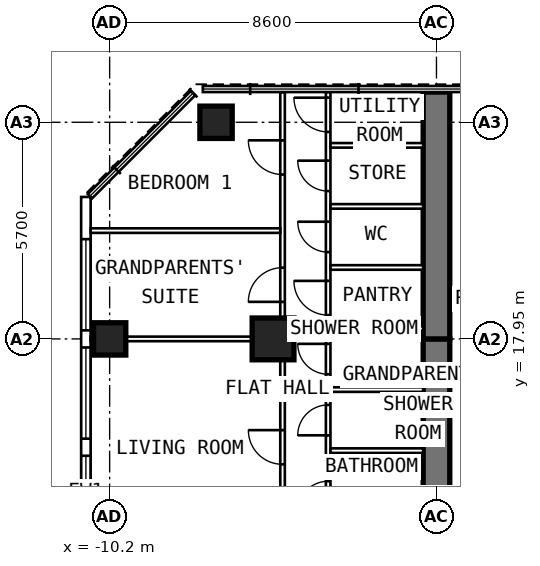
"""IFC4 building model, lengths in metres.
Left out: names, types, materials, properties, quantities, classifications, styles, units other than length and angle.
Written with IfcOpenShell. Run it as: python <this file> out.ifc"""

import sys

from ifc_helpers import new_model, si_unit, direction, frame, frame_2d, origin, origin_2d, place, context, subcontext, project, spatial, rectangle, extrude, element, fill, save


model = new_model("IFC4")
c1 = context("Model", 3, precision=1e-05, world=origin(), true_north=direction((0.0, 1.0)))
c2 = subcontext(c1, "Body", "Model", "MODEL_VIEW")
j1 = project(units=[si_unit("LENGTHUNIT", "METRE"), si_unit("PLANEANGLEUNIT", "RADIAN")], contexts=[c1])
p1 = place(None, origin())
s1 = spatial("IfcSite", under=j1, at=p1, CompositionType="ELEMENT")
p2 = place(p1, origin())
s2 = spatial("IfcBuilding", under=s1, at=p2, CompositionType="ELEMENT")
p3 = place(p2, frame((0.0, 0.0, 249.6)))
s3 = spatial("IfcBuildingStorey", under=s2, at=p3, CompositionType="ELEMENT", Elevation=249.6)
for number, where, z_axis, x_axis in (
    (1, (-10.2, 17.95, 0.0), (0.0, 0.0, 1.0), (0.0, 1.0, 0.0)),
    (2, (-7.4, 23.65, 0.0), (0.0, 0.0, 1.0), (0.0, 1.0, 0.0)),
):
    element("IfcColumn", number, at=place(p3, frame(where, z_axis=z_axis, x_axis=x_axis)), inside=s3, PredefinedType="COLUMN", context=c2, shape_type="SweptSolid", body=[
        extrude(rectangle(XDim=0.85, YDim=0.85, at=origin_2d()), origin(), (0.0, 0.0, 1.0), 3.6),
    ])
p4 = place(p3, frame((-5.9, 17.95, 0.0), z_axis=(0.0, 0.0, 1.0), x_axis=(0.0, 1.0, 0.0)))
e3 = element("IfcColumn", 3, at=p4, inside=s3, PredefinedType="COLUMN", context=c2, shape_type="SweptSolid", body=[
    extrude(rectangle(XDim=1.1, YDim=1.1, at=origin_2d()), origin(), (0.0, 0.0, 1.0), 3.6),
])
p5 = place(p3, frame((-1.6, 9.6, 0.0), z_axis=(0.0, 0.0, 1.0), x_axis=(0.0, 1.0, 0.0)))
e4 = element("IfcWall", 4, at=p5, inside=s3, PredefinedType="SHEAR", context=c2, shape_type="SweptSolid", body=[
    extrude(rectangle(XDim=8.35, YDim=0.7, at=frame_2d((4.175, 0.0))), origin(), (0.0, 0.0, 1.0), 3.6),
])
p6 = place(p5, frame((1.3, 0.0, 0.0)))
e5 = element("IfcOpeningElement", 5, at=p6, cuts=e4, PredefinedType="OPENING", context=c2, shape_type="SweptSolid", body=[
    extrude(rectangle(XDim=1.0, YDim=2.1, at=frame_2d((0.5, 1.05))), frame((0.0, 0.362, 0.0), z_axis=(0.0, -1.0, 0.0), x_axis=(1.0, 0.0, 0.0)), (0.0, 0.0, 1.0), 0.724),
])
p7 = place(p3, frame((-1.6, 17.95, 0.0), z_axis=(0.0, 0.0, 1.0), x_axis=(0.0, 1.0, 0.0)))
e6 = element("IfcWall", 6, at=p7, inside=s3, PredefinedType="SHEAR", context=c2, shape_type="SweptSolid", body=[
    extrude(rectangle(XDim=6.495, YDim=0.7, at=frame_2d((3.248, 0.0))), origin(), (0.0, 0.0, 1.0), 3.6),
])
p8 = place(p3, frame((-10.825, 6.148, 0.0), z_axis=(0.0, 0.0, 1.0), x_axis=(0.0, 1.0, 0.0)))
e7 = element("IfcWall", 7, at=p8, inside=s3, PredefinedType="SOLIDWALL", context=c2, shape_type="SweptSolid", body=[
    extrude(rectangle(XDim=15.537, YDim=0.25, at=frame_2d((7.769, 0.0))), origin(), (0.0, 0.0, 1.0), 3.35),
])
p9 = place(p8, frame((0.627, 0.0, 0.8)))
e8 = element("IfcOpeningElement", 8, at=p9, cuts=e7, PredefinedType="OPENING", context=c2, shape_type="SweptSolid", body=[
    extrude(rectangle(XDim=2.4, YDim=1.8, at=frame_2d((1.2, 0.9))), frame((0.0, 0.137, 0.0), z_axis=(0.0, -1.0, 0.0), x_axis=(1.0, 0.0, 0.0)), (0.0, 0.0, 1.0), 0.274),
])
p10 = place(p8, frame((3.477, 0.0, 0.8)))
e9 = element("IfcOpeningElement", 9, at=p10, cuts=e7, PredefinedType="OPENING", context=c2, shape_type="SweptSolid", body=[
    extrude(rectangle(XDim=2.4, YDim=1.8, at=frame_2d((1.2, 0.9))), frame((0.0, 0.137, 0.0), z_axis=(0.0, -1.0, 0.0), x_axis=(1.0, 0.0, 0.0)), (0.0, 0.0, 1.0), 0.274),
])
p11 = place(p8, frame((6.327, 0.0, 0.8)))
e10 = element("IfcOpeningElement", 10, at=p11, cuts=e7, PredefinedType="OPENING", context=c2, shape_type="SweptSolid", body=[
    extrude(rectangle(XDim=2.4, YDim=1.8, at=frame_2d((1.2, 0.9))), frame((0.0, 0.137, 0.0), z_axis=(0.0, -1.0, 0.0), x_axis=(1.0, 0.0, 0.0)), (0.0, 0.0, 1.0), 0.274),
])
p12 = place(p8, frame((9.177, 0.0, 0.8)))
e11 = element("IfcOpeningElement", 11, at=p12, cuts=e7, PredefinedType="OPENING", context=c2, shape_type="SweptSolid", body=[
    extrude(rectangle(XDim=2.4, YDim=1.8, at=frame_2d((1.2, 0.9))), frame((0.0, 0.137, 0.0), z_axis=(0.0, -1.0, 0.0), x_axis=(1.0, 0.0, 0.0)), (0.0, 0.0, 1.0), 0.274),
])
p13 = place(p8, frame((12.027, 0.0, 0.8)))
e12 = element("IfcOpeningElement", 12, at=p13, cuts=e7, PredefinedType="OPENING", context=c2, shape_type="SweptSolid", body=[
    extrude(rectangle(XDim=2.4, YDim=1.8, at=frame_2d((1.2, 0.9))), frame((0.0, 0.137, 0.0), z_axis=(0.0, -1.0, 0.0), x_axis=(1.0, 0.0, 0.0)), (0.0, 0.0, 1.0), 0.274),
])
p14 = place(p3, frame((-4.45, 9.9, 0.0), z_axis=(0.0, 0.0, 1.0), x_axis=(0.0, 1.0, 0.0)))
e13 = element("IfcWall", 13, at=p14, inside=s3, PredefinedType="PARTITIONING", context=c2, shape_type="SweptSolid", body=[
    extrude(rectangle(XDim=14.545, YDim=0.12, at=frame_2d((7.272, 0.0))), origin(), (0.0, 0.0, 1.0), 3.35),
])
p15 = place(p14, frame((0.95, 0.0, 0.0)))
e14 = element("IfcOpeningElement", 14, at=p15, cuts=e13, PredefinedType="OPENING", context=c2, shape_type="SweptSolid", body=[
    extrude(rectangle(XDim=0.9, YDim=2.1, at=frame_2d((0.45, 1.05))), frame((0.0, 0.072, 0.0), z_axis=(0.0, -1.0, 0.0), x_axis=(1.0, 0.0, 0.0)), (0.0, 0.0, 1.0), 0.144),
])
p16 = place(p14, frame((3.505, 0.0, 0.0)))
e15 = element("IfcOpeningElement", 15, at=p16, cuts=e13, PredefinedType="OPENING", context=c2, shape_type="SweptSolid", body=[
    extrude(rectangle(XDim=0.8, YDim=2.1, at=frame_2d((0.4, 1.05))), frame((0.0, 0.072, 0.0), z_axis=(0.0, -1.0, 0.0), x_axis=(1.0, 0.0, 0.0)), (0.0, 0.0, 1.0), 0.144),
])
p17 = place(p14, frame((5.513, 0.0, 0.0)))
e16 = element("IfcOpeningElement", 16, at=p17, cuts=e13, PredefinedType="OPENING", context=c2, shape_type="SweptSolid", body=[
    extrude(rectangle(XDim=0.8, YDim=2.1, at=frame_2d((0.4, 1.05))), frame((0.0, 0.072, 0.0), z_axis=(0.0, -1.0, 0.0), x_axis=(1.0, 0.0, 0.0)), (0.0, 0.0, 1.0), 0.144),
])
p18 = place(p14, frame((7.12, 0.0, 0.0)))
e17 = element("IfcOpeningElement", 17, at=p18, cuts=e13, PredefinedType="OPENING", context=c2, shape_type="SweptSolid", body=[
    extrude(rectangle(XDim=0.8, YDim=2.1, at=frame_2d((0.4, 1.05))), frame((0.0, 0.072, 0.0), z_axis=(0.0, -1.0, 0.0), x_axis=(1.0, 0.0, 0.0)), (0.0, 0.0, 1.0), 0.144),
])
p19 = place(p14, frame((8.677, 0.0, 0.0)))
e18 = element("IfcOpeningElement", 18, at=p19, cuts=e13, PredefinedType="OPENING", context=c2, shape_type="SweptSolid", body=[
    extrude(rectangle(XDim=0.9, YDim=2.1, at=frame_2d((0.45, 1.05))), frame((0.0, 0.072, 0.0), z_axis=(0.0, -1.0, 0.0), x_axis=(1.0, 0.0, 0.0)), (0.0, 0.0, 1.0), 0.144),
])
p20 = place(p14, frame((10.333, 0.0, 0.0)))
e19 = element("IfcOpeningElement", 19, at=p20, cuts=e13, PredefinedType="OPENING", context=c2, shape_type="SweptSolid", body=[
    extrude(rectangle(XDim=0.8, YDim=2.1, at=frame_2d((0.4, 1.05))), frame((0.0, 0.072, 0.0), z_axis=(0.0, -1.0, 0.0), x_axis=(1.0, 0.0, 0.0)), (0.0, 0.0, 1.0), 0.144),
])
p21 = place(p14, frame((11.94, 0.0, 0.0)))
e20 = element("IfcOpeningElement", 20, at=p21, cuts=e13, PredefinedType="OPENING", context=c2, shape_type="SweptSolid", body=[
    extrude(rectangle(XDim=0.8, YDim=2.1, at=frame_2d((0.4, 1.05))), frame((0.0, 0.072, 0.0), z_axis=(0.0, -1.0, 0.0), x_axis=(1.0, 0.0, 0.0)), (0.0, 0.0, 1.0), 0.144),
])
p22 = place(p14, frame((13.497, 0.0, 0.0)))
e21 = element("IfcOpeningElement", 21, at=p22, cuts=e13, PredefinedType="OPENING", context=c2, shape_type="SweptSolid", body=[
    extrude(rectangle(XDim=0.9, YDim=2.1, at=frame_2d((0.45, 1.05))), frame((0.0, 0.072, 0.0), z_axis=(0.0, -1.0, 0.0), x_axis=(1.0, 0.0, 0.0)), (0.0, 0.0, 1.0), 0.144),
])
p23 = place(p3, frame((-5.65, 9.6, 0.0), z_axis=(0.0, 0.0, 1.0), x_axis=(0.0, 1.0, 0.0)))
e22 = element("IfcWall", 22, at=p23, inside=s3, PredefinedType="PARTITIONING", context=c2, shape_type="SweptSolid", body=[
    extrude(rectangle(XDim=14.845, YDim=0.12, at=frame_2d((7.422, 0.0))), origin(), (0.0, 0.0, 1.0), 3.35),
])
p24 = place(p23, frame((5.05, 0.0, 0.0)))
e23 = element("IfcOpeningElement", 23, at=p24, cuts=e22, PredefinedType="OPENING", context=c2, shape_type="SweptSolid", body=[
    extrude(rectangle(XDim=0.9, YDim=2.1, at=frame_2d((0.45, 1.05))), frame((0.0, 0.072, 0.0), z_axis=(0.0, -1.0, 0.0), x_axis=(1.0, 0.0, 0.0)), (0.0, 0.0, 1.0), 0.144),
])
p25 = place(p23, frame((9.325, 0.0, 0.0)))
e24 = element("IfcOpeningElement", 24, at=p25, cuts=e22, PredefinedType="OPENING", context=c2, shape_type="SweptSolid", body=[
    extrude(rectangle(XDim=0.9, YDim=2.1, at=frame_2d((0.45, 1.05))), frame((0.0, 0.072, 0.0), z_axis=(0.0, -1.0, 0.0), x_axis=(1.0, 0.0, 0.0)), (0.0, 0.0, 1.0), 0.144),
])
p26 = place(p23, frame((12.675, 0.0, 0.0)))
e25 = element("IfcOpeningElement", 25, at=p26, cuts=e22, PredefinedType="OPENING", context=c2, shape_type="SweptSolid", body=[
    extrude(rectangle(XDim=0.9, YDim=2.1, at=frame_2d((0.45, 1.05))), frame((0.0, 0.072, 0.0), z_axis=(0.0, -1.0, 0.0), x_axis=(1.0, 0.0, 0.0)), (0.0, 0.0, 1.0), 0.144),
])
p27 = place(p3, frame((-5.71, 17.95, 0.0), z_axis=(0.0, 0.0, 1.0), x_axis=(-1.0, 0.0, 0.0)))
e26 = element("IfcWall", 26, at=p27, inside=s3, PredefinedType="PARTITIONING", context=c2, shape_type="SweptSolid", body=[
    extrude(rectangle(XDim=4.99, YDim=0.12, at=frame_2d((2.495, 0.0))), origin(), (0.0, 0.0, 1.0), 2.45),
])
p28 = place(p3, frame((-5.71, 20.8, 0.0), z_axis=(0.0, 0.0, 1.0), x_axis=(-1.0, 0.0, 0.0)))
e27 = element("IfcWall", 27, at=p28, inside=s3, PredefinedType="PARTITIONING", context=c2, shape_type="SweptSolid", body=[
    extrude(rectangle(XDim=4.99, YDim=0.12, at=frame_2d((2.495, 0.0))), origin(), (0.0, 0.0, 1.0), 3.35),
])
for number, where, z_axis, x_axis in (
    (28, (-1.95, 15.01, 0.0), (0.0, 0.0, 1.0), (-1.0, 0.0, 0.0)),
    (29, (-1.95, 16.617, 0.0), (0.0, 0.0, 1.0), (-1.0, 0.0, 0.0)),
):
    element("IfcWall", number, at=place(p3, frame(where, z_axis=z_axis, x_axis=x_axis)), inside=s3, PredefinedType="PARTITIONING", context=c2, shape_type="SweptSolid", body=[
        extrude(rectangle(XDim=2.44, YDim=0.12, at=frame_2d((1.22, 0.0))), origin(), (0.0, 0.0, 1.0), 3.35),
    ])
p29 = place(p3, frame((-1.95, 18.223, 0.0), z_axis=(0.0, 0.0, 1.0), x_axis=(-1.0, 0.0, 0.0)))
e30 = element("IfcWall", 30, at=p29, inside=s3, PredefinedType="PARTITIONING", context=c2, shape_type="SweptSolid", body=[
    extrude(rectangle(XDim=2.44, YDim=0.12, at=frame_2d((1.22, 0.0))), origin(), (0.0, 0.0, 1.0), 2.45),
])
for number, where, z_axis, x_axis in (
    (31, (-1.95, 19.83, 0.0), (0.0, 0.0, 1.0), (-1.0, 0.0, 0.0)),
    (32, (-1.95, 21.437, 0.0), (0.0, 0.0, 1.0), (-1.0, 0.0, 0.0)),
    (33, (-1.95, 23.043, 0.0), (0.0, 0.0, 1.0), (-1.0, 0.0, 0.0)),
):
    element("IfcWall", number, at=place(p3, frame(where, z_axis=z_axis, x_axis=x_axis)), inside=s3, PredefinedType="PARTITIONING", context=c2, shape_type="SweptSolid", body=[
        extrude(rectangle(XDim=2.44, YDim=0.12, at=frame_2d((1.22, 0.0))), origin(), (0.0, 0.0, 1.0), 3.35),
    ])
p30 = place(p11, origin())
e34 = element("IfcWindow", 34, at=p30, inside=s3, PartitioningType="SINGLE_PANEL", PredefinedType="WINDOW", context=c2, shape_type="SweptSolid", body=[
    extrude(rectangle(XDim=2.4, YDim=1.8, at=frame_2d((1.2, 0.9))), frame((0.0, 0.03, 0.0), z_axis=(0.0, -1.0, 0.0), x_axis=(1.0, 0.0, 0.0)), (0.0, 0.0, 1.0), 0.06),
])
fill(e10, e34)
p31 = place(p12, origin())
e35 = element("IfcWindow", 35, at=p31, inside=s3, PartitioningType="SINGLE_PANEL", PredefinedType="WINDOW", context=c2, shape_type="SweptSolid", body=[
    extrude(rectangle(XDim=2.4, YDim=1.8, at=frame_2d((1.2, 0.9))), frame((0.0, 0.03, 0.0), z_axis=(0.0, -1.0, 0.0), x_axis=(1.0, 0.0, 0.0)), (0.0, 0.0, 1.0), 0.06),
])
fill(e11, e35)
p32 = place(p13, origin())
e36 = element("IfcWindow", 36, at=p32, inside=s3, PartitioningType="SINGLE_PANEL", PredefinedType="WINDOW", context=c2, shape_type="SweptSolid", body=[
    extrude(rectangle(XDim=2.4, YDim=1.8, at=frame_2d((1.2, 0.9))), frame((0.0, 0.03, 0.0), z_axis=(0.0, -1.0, 0.0), x_axis=(1.0, 0.0, 0.0)), (0.0, 0.0, 1.0), 0.06),
])
fill(e12, e36)
p33 = place(p24, origin())
e37 = element("IfcDoor", 37, at=p33, inside=s3, OperationType="SINGLE_SWING_RIGHT", PredefinedType="DOOR", context=c2, shape_type="SweptSolid", body=[
    extrude(rectangle(XDim=0.9, YDim=2.1, at=frame_2d((0.45, 1.05))), frame((0.0, 0.025, 0.0), z_axis=(0.0, -1.0, 0.0), x_axis=(1.0, 0.0, 0.0)), (0.0, 0.0, 1.0), 0.05),
])
fill(e23, e37)
p34 = place(p25, origin())
e38 = element("IfcDoor", 38, at=p34, inside=s3, OperationType="SINGLE_SWING_LEFT", PredefinedType="DOOR", context=c2, shape_type="SweptSolid", body=[
    extrude(rectangle(XDim=0.9, YDim=2.1, at=frame_2d((0.45, 1.05))), frame((0.0, 0.025, 0.0), z_axis=(0.0, -1.0, 0.0), x_axis=(1.0, 0.0, 0.0)), (0.0, 0.0, 1.0), 0.05),
])
fill(e24, e38)
p35 = place(p26, origin())
e39 = element("IfcDoor", 39, at=p35, inside=s3, OperationType="SINGLE_SWING_RIGHT", PredefinedType="DOOR", context=c2, shape_type="SweptSolid", body=[
    extrude(rectangle(XDim=0.9, YDim=2.1, at=frame_2d((0.45, 1.05))), frame((0.0, 0.025, 0.0), z_axis=(0.0, -1.0, 0.0), x_axis=(1.0, 0.0, 0.0)), (0.0, 0.0, 1.0), 0.05),
])
fill(e25, e39)
p36 = place(p16, origin())
e40 = element("IfcDoor", 40, at=p36, inside=s3, OperationType="SINGLE_SWING_LEFT", PredefinedType="DOOR", context=c2, shape_type="SweptSolid", body=[
    extrude(rectangle(XDim=0.8, YDim=2.1, at=frame_2d((0.4, 1.05))), frame((0.0, 0.025, 0.0), z_axis=(0.0, -1.0, 0.0), x_axis=(1.0, 0.0, 0.0)), (0.0, 0.0, 1.0), 0.05),
])
fill(e15, e40)
p37 = place(p17, origin())
e41 = element("IfcDoor", 41, at=p37, inside=s3, OperationType="SINGLE_SWING_LEFT", PredefinedType="DOOR", context=c2, shape_type="SweptSolid", body=[
    extrude(rectangle(XDim=0.8, YDim=2.1, at=frame_2d((0.4, 1.05))), frame((0.0, 0.025, 0.0), z_axis=(0.0, -1.0, 0.0), x_axis=(1.0, 0.0, 0.0)), (0.0, 0.0, 1.0), 0.05),
])
fill(e16, e41)
p38 = place(p18, origin())
e42 = element("IfcDoor", 42, at=p38, inside=s3, OperationType="SINGLE_SWING_RIGHT", PredefinedType="DOOR", context=c2, shape_type="SweptSolid", body=[
    extrude(rectangle(XDim=0.8, YDim=2.1, at=frame_2d((0.4, 1.05))), frame((0.0, 0.025, 0.0), z_axis=(0.0, -1.0, 0.0), x_axis=(1.0, 0.0, 0.0)), (0.0, 0.0, 1.0), 0.05),
])
fill(e17, e42)
p39 = place(p19, origin())
e43 = element("IfcDoor", 43, at=p39, inside=s3, OperationType="SINGLE_SWING_RIGHT", PredefinedType="DOOR", context=c2, shape_type="SweptSolid", body=[
    extrude(rectangle(XDim=0.9, YDim=2.1, at=frame_2d((0.45, 1.05))), frame((0.0, 0.025, 0.0), z_axis=(0.0, -1.0, 0.0), x_axis=(1.0, 0.0, 0.0)), (0.0, 0.0, 1.0), 0.05),
])
fill(e18, e43)
p40 = place(p20, origin())
e44 = element("IfcDoor", 44, at=p40, inside=s3, OperationType="SINGLE_SWING_RIGHT", PredefinedType="DOOR", context=c2, shape_type="SweptSolid", body=[
    extrude(rectangle(XDim=0.8, YDim=2.1, at=frame_2d((0.4, 1.05))), frame((0.0, 0.025, 0.0), z_axis=(0.0, -1.0, 0.0), x_axis=(1.0, 0.0, 0.0)), (0.0, 0.0, 1.0), 0.05),
])
fill(e19, e44)
p41 = place(p21, origin())
e45 = element("IfcDoor", 45, at=p41, inside=s3, OperationType="SINGLE_SWING_RIGHT", PredefinedType="DOOR", context=c2, shape_type="SweptSolid", body=[
    extrude(rectangle(XDim=0.8, YDim=2.1, at=frame_2d((0.4, 1.05))), frame((0.0, 0.025, 0.0), z_axis=(0.0, -1.0, 0.0), x_axis=(1.0, 0.0, 0.0)), (0.0, 0.0, 1.0), 0.05),
])
fill(e20, e45)
p42 = place(p22, origin())
e46 = element("IfcDoor", 46, at=p42, inside=s3, OperationType="SINGLE_SWING_RIGHT", PredefinedType="DOOR", context=c2, shape_type="SweptSolid", body=[
    extrude(rectangle(XDim=0.9, YDim=2.1, at=frame_2d((0.45, 1.05))), frame((0.0, 0.025, 0.0), z_axis=(0.0, -1.0, 0.0), x_axis=(1.0, 0.0, 0.0)), (0.0, 0.0, 1.0), 0.05),
])
fill(e21, e46)
save(model, sys.argv[1])
